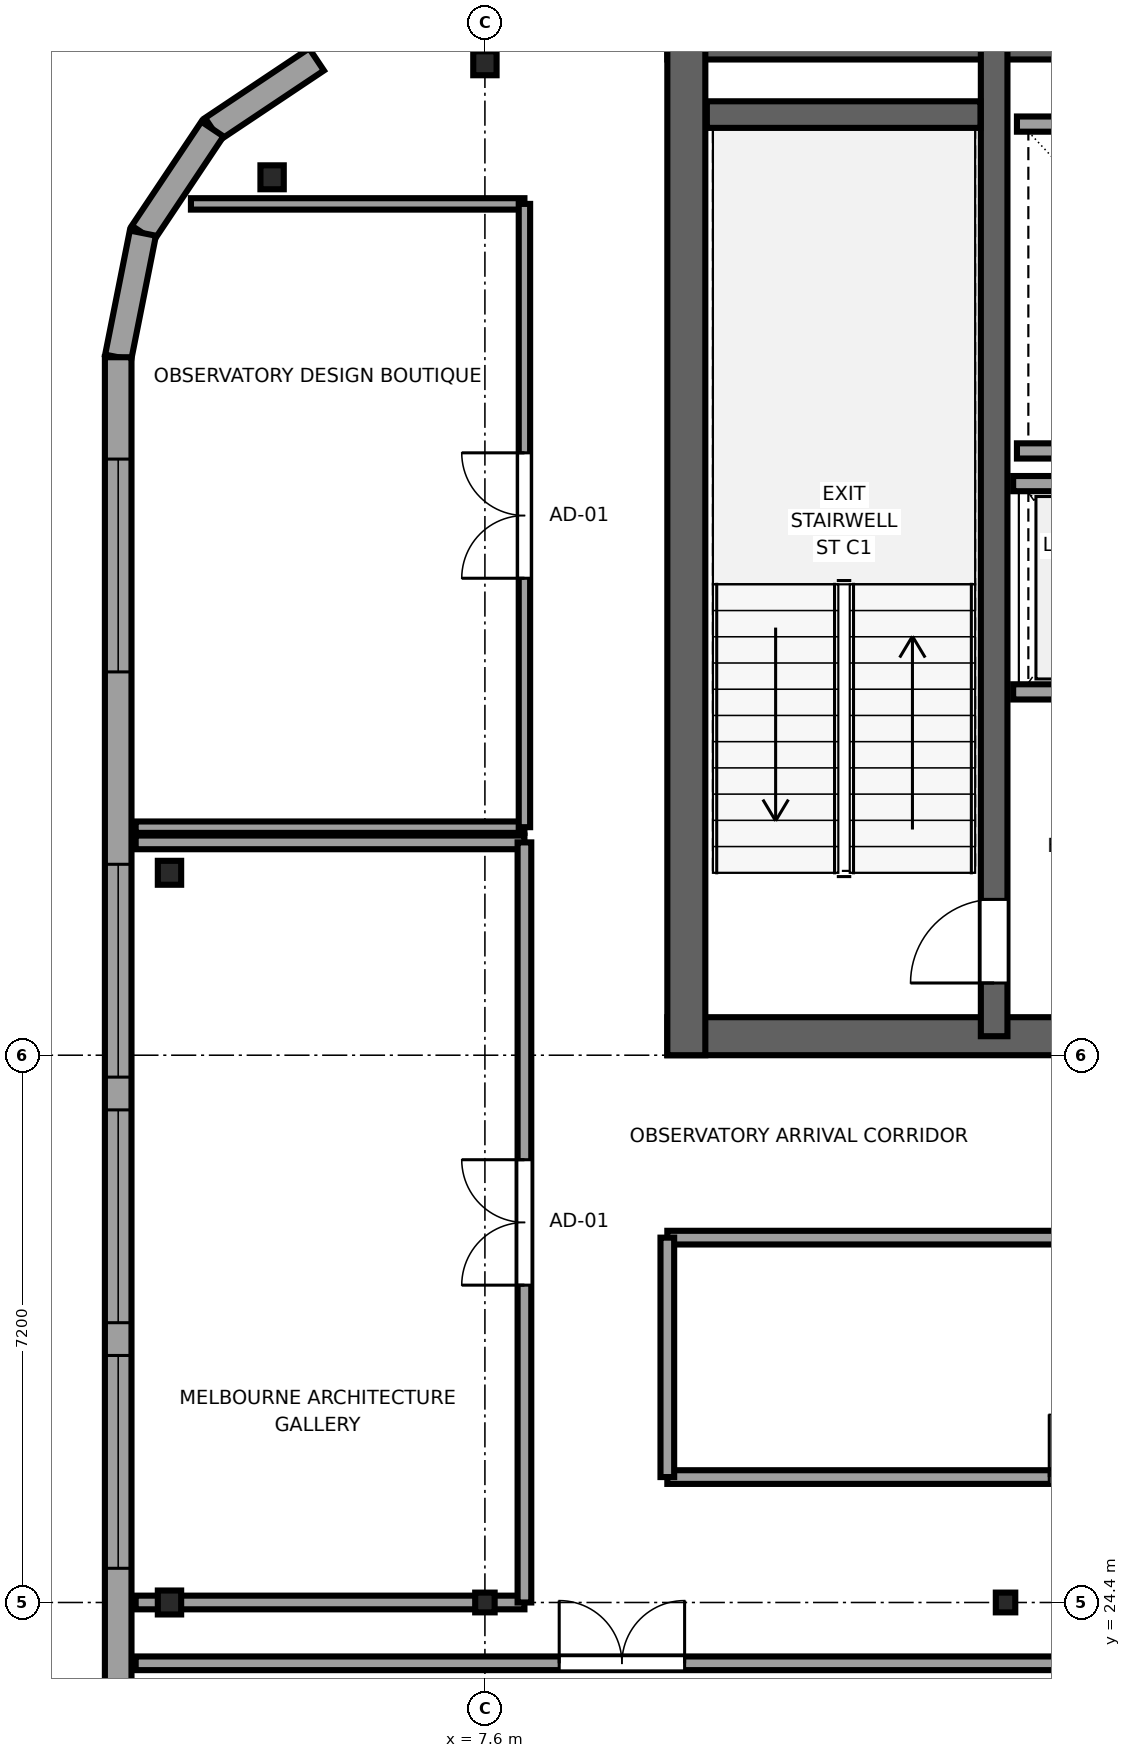
"""IFC4 building model, lengths in metres.
Left out: names, types, materials, properties, quantities, classifications, styles, units other than length and angle.
Written with IfcOpenShell. Run it as: python <this file> out.ifc"""

import sys

from ifc_helpers import new_model, si_unit, direction, frame, frame_2d, origin, origin_2d, place, context, subcontext, project, spatial, rectangle, i_section, extrude, source, transform, mapped, element, fill, save


model = new_model("IFC4")
c1 = context("Model", 3, precision=1e-05, world=origin(), true_north=direction((0.0, 1.0)))
c2 = subcontext(c1, "Body", "Model", "MODEL_VIEW")
j1 = project(units=[si_unit("LENGTHUNIT", "METRE"), si_unit("PLANEANGLEUNIT", "RADIAN")], contexts=[c1])
p1 = place(None, origin())
s1 = spatial("IfcSite", under=j1, at=p1, CompositionType="ELEMENT")
p2 = place(p1, origin())
s2 = spatial("IfcBuilding", under=s1, at=p2, CompositionType="ELEMENT")
p3 = place(p2, frame((0.0, 0.0, 282.15)))
s3 = spatial("IfcBuildingStorey", under=s2, at=p3, CompositionType="ELEMENT", Elevation=282.15)
p4 = place(p3, frame((10.0, 31.85, 0.0), z_axis=(0.0, 0.0, 1.0), x_axis=(1.0, 0.0, 0.0)))
e1 = element("IfcWall", 1, at=p4, inside=s3, PredefinedType="SHEAR", context=c2, shape_type="SweptSolid", body=[
    extrude(rectangle(XDim=26.0, YDim=0.5, at=frame_2d((13.0, 0.0))), origin(), (0.0, 0.0, 1.0), 4.4),
])
p5 = place(p4, frame((7.45, 0.0, 0.0), z_axis=(0.0, 0.0, 1.0), x_axis=(-1.0, 0.0, 0.0)))
e2 = element("IfcOpeningElement", 2, at=p5, cuts=e1, PredefinedType="OPENING", context=c2, shape_type="SweptSolid", body=[
    extrude(rectangle(XDim=1.5, YDim=2.04, at=frame_2d((0.75, 1.02))), frame((0.0, 0.26, 0.0), z_axis=(0.0, -1.0, 0.0), x_axis=(1.0, 0.0, 0.0)), (0.0, 0.0, 1.0), 0.52),
])
p6 = place(p4, frame((13.75, 0.0, 0.0), z_axis=(0.0, 0.0, 1.0), x_axis=(-1.0, 0.0, 0.0)))
e3 = element("IfcOpeningElement", 3, at=p6, cuts=e1, PredefinedType="OPENING", context=c2, shape_type="SweptSolid", body=[
    extrude(rectangle(XDim=1.5, YDim=2.04, at=frame_2d((0.75, 1.02))), frame((0.0, 0.26, 0.0), z_axis=(0.0, -1.0, 0.0), x_axis=(1.0, 0.0, 0.0)), (0.0, 0.0, 1.0), 0.52),
])
p7 = place(p4, frame((20.05, 0.0, 0.0), z_axis=(0.0, 0.0, 1.0), x_axis=(-1.0, 0.0, 0.0)))
e4 = element("IfcOpeningElement", 4, at=p7, cuts=e1, PredefinedType="OPENING", context=c2, shape_type="SweptSolid", body=[
    extrude(rectangle(XDim=1.5, YDim=2.04, at=frame_2d((0.75, 1.02))), frame((0.0, 0.26, 0.0), z_axis=(0.0, -1.0, 0.0), x_axis=(1.0, 0.0, 0.0)), (0.0, 0.0, 1.0), 0.52),
])
p8 = place(p3, frame((10.0, 44.95, 0.0), z_axis=(0.0, 0.0, 1.0), x_axis=(1.0, 0.0, 0.0)))
e5 = element("IfcWall", 5, at=p8, inside=s3, PredefinedType="SHEAR", context=c2, shape_type="SweptSolid", body=[
    extrude(rectangle(XDim=26.0, YDim=0.5, at=frame_2d((13.0, 0.0))), origin(), (0.0, 0.0, 1.0), 4.4),
])
p9 = place(p3, frame((10.25, 31.6, 0.0), z_axis=(0.0, 0.0, 1.0), x_axis=(0.0, 1.0, 0.0)))
e6 = element("IfcWall", 6, at=p9, inside=s3, PredefinedType="SHEAR", context=c2, shape_type="SweptSolid", body=[
    extrude(rectangle(XDim=13.6, YDim=0.5, at=frame_2d((6.8, 0.0))), origin(), (0.0, 0.0, 1.0), 4.4),
])
p10 = place(p3, frame((14.3, 31.85, 0.0), z_axis=(0.0, 0.0, 1.0), x_axis=(0.0, 1.0, 0.0)))
e7 = element("IfcWall", 7, at=p10, inside=s3, PredefinedType="SHEAR", context=c2, shape_type="SweptSolid", body=[
    extrude(rectangle(XDim=13.1, YDim=0.35, at=frame_2d((6.55, 0.0))), origin(), (0.0, 0.0, 1.0), 4.4),
])
p11 = place(p10, frame((0.7, 0.0, 0.0)))
e8 = element("IfcOpeningElement", 8, at=p11, cuts=e7, PredefinedType="OPENING", context=c2, shape_type="SweptSolid", body=[
    extrude(rectangle(XDim=1.1, YDim=2.12, at=frame_2d((0.55, 1.06))), frame((0.0, 0.185, 0.0), z_axis=(0.0, -1.0, 0.0), x_axis=(1.0, 0.0, 0.0)), (0.0, 0.0, 1.0), 0.37),
])
p12 = place(p3, frame((10.52, 43.975, 0.0), z_axis=(0.0, 0.0, 1.0), x_axis=(1.0, 0.0, 0.0)))
e9 = element("IfcWall", 9, at=p12, inside=s3, PredefinedType="SHEAR", context=c2, shape_type="SweptSolid", body=[
    extrude(rectangle(XDim=3.6, YDim=0.35, at=frame_2d((1.8, 0.0))), origin(), (0.0, 0.0, 1.0), 4.4),
])
m1 = source(origin(), c2, "Body", "SweptSolid", [
    extrude(i_section(OverallWidth=0.307, OverallDepth=0.315, WebThickness=0.012, FlangeThickness=0.019, FilletRadius=0.017, at=origin_2d()), origin(), (0.0, 0.0, 1.0), 4.4),
])
p13 = place(p3, frame((3.45, 24.4, 0.0), z_axis=(0.0, 0.0, 1.0), x_axis=(1.0, 0.0, 0.0)))
e10 = element("IfcColumn", 10, at=p13, inside=s3, PredefinedType="COLUMN", context=c2, shape_type="MappedRepresentation", body=[
    mapped(m1, transform((0.0, 0.0, 0.0), x_axis=(1.0, 0.0, 0.0), y_axis=(0.0, 1.0, 0.0), z_axis=(0.0, 0.0, 1.0), scale=1.0)),
])
m2 = source(origin(), c2, "Body", "SweptSolid", [
    extrude(i_section(OverallWidth=0.256, OverallDepth=0.26, WebThickness=0.01, FlangeThickness=0.017, FilletRadius=0.014, at=origin_2d()), origin(), (0.0, 0.0, 1.0), 4.4),
])
for number, where, z_axis, x_axis in (
    (11, (7.6, 24.4, 0.0), (0.0, 0.0, 1.0), (1.0, 0.0, 0.0)),
    (12, (14.45, 24.4, 0.0), (0.0, 0.0, 1.0), (1.0, 0.0, 0.0)),
):
    element("IfcColumn", number, at=place(p3, frame(where, z_axis=z_axis, x_axis=x_axis)), inside=s3, PredefinedType="COLUMN", context=c2, shape_type="MappedRepresentation", body=[
        mapped(m2, transform((0.0, 0.0, 0.0), x_axis=(1.0, 0.0, 0.0), y_axis=(0.0, 1.0, 0.0), z_axis=(0.0, 0.0, 1.0), scale=1.0)),
    ])
for number, where, z_axis, x_axis in (
    (13, (4.8, 43.15, 0.0), (0.0, 0.0, 1.0), (1.0, 0.0, 0.0)),
    (14, (7.6, 44.65, 0.0), (0.0, 0.0, 1.0), (1.0, 0.0, 0.0)),
    (15, (3.45, 34.0, 0.0), (0.0, 0.0, 1.0), (1.0, 0.0, 0.0)),
):
    element("IfcColumn", number, at=place(p3, frame(where, z_axis=z_axis, x_axis=x_axis)), inside=s3, PredefinedType="COLUMN", context=c2, shape_type="MappedRepresentation", body=[
        mapped(m1, transform((0.0, 0.0, 0.0), x_axis=(1.0, 0.0, 0.0), y_axis=(0.0, 1.0, 0.0), z_axis=(0.0, 0.0, 1.0), scale=1.0)),
    ])
for number, where, z_axis, x_axis in (
    (16, (5.385, 44.7, 0.0), (0.0, 0.0, 1.0), (-0.832, -0.556, 0.0)),
    (17, (4.015, 43.785, 0.0), (0.0, 0.0, 1.0), (-0.556, -0.831, 0.0)),
):
    element("IfcWall", number, at=place(p3, frame(where, z_axis=z_axis, x_axis=x_axis)), inside=s3, PredefinedType="SOLIDWALL", context=c2, shape_type="SweptSolid", body=[
        extrude(rectangle(XDim=1.647, YDim=0.35, at=frame_2d((0.824, 0.0))), origin(), (0.0, 0.0, 1.0), 3.71),
    ])
p14 = place(p3, frame((3.1, 42.416, 0.0), z_axis=(0.0, 0.0, 1.0), x_axis=(-0.195044345786, -0.980794424524, 0.0)))
e18 = element("IfcWall", 18, at=p14, inside=s3, PredefinedType="SOLIDWALL", context=c2, shape_type="SweptSolid", body=[
    extrude(rectangle(XDim=1.665, YDim=0.35, at=frame_2d((0.833, 0.0))), origin(), (0.0, 0.0, 1.0), 4.18),
])
p15 = place(p3, frame((2.775, 40.783, 0.0), z_axis=(0.0, 0.0, 1.0), x_axis=(0.0, -1.0, 0.0)))
e19 = element("IfcWall", 19, at=p15, inside=s3, PredefinedType="SOLIDWALL", context=c2, shape_type="SweptSolid", body=[
    extrude(rectangle(XDim=31.166, YDim=0.35, at=frame_2d((15.583, 0.0))), origin(), (0.0, 0.0, 1.0), 4.18),
])
p16 = place(p15, frame((1.34, 0.0, 0.62)))
e20 = element("IfcOpeningElement", 20, at=p16, cuts=e19, PredefinedType="OPENING", context=c2, shape_type="SweptSolid", body=[
    extrude(rectangle(XDim=2.8, YDim=2.25, at=frame_2d((1.4, 1.125))), frame((0.0, 0.185, 0.0), z_axis=(0.0, -1.0, 0.0), x_axis=(1.0, 0.0, 0.0)), (0.0, 0.0, 1.0), 0.37),
])
p17 = place(p15, frame((6.671, 0.0, 0.62)))
e21 = element("IfcOpeningElement", 21, at=p17, cuts=e19, PredefinedType="OPENING", context=c2, shape_type="SweptSolid", body=[
    extrude(rectangle(XDim=2.8, YDim=2.25, at=frame_2d((1.4, 1.125))), frame((0.0, 0.185, 0.0), z_axis=(0.0, -1.0, 0.0), x_axis=(1.0, 0.0, 0.0)), (0.0, 0.0, 1.0), 0.37),
])
p18 = place(p15, frame((9.902, 0.0, 0.62)))
e22 = element("IfcOpeningElement", 22, at=p18, cuts=e19, PredefinedType="OPENING", context=c2, shape_type="SweptSolid", body=[
    extrude(rectangle(XDim=2.8, YDim=2.25, at=frame_2d((1.4, 1.125))), frame((0.0, 0.185, 0.0), z_axis=(0.0, -1.0, 0.0), x_axis=(1.0, 0.0, 0.0)), (0.0, 0.0, 1.0), 0.37),
])
p19 = place(p15, frame((13.133, 0.0, 0.62)))
e23 = element("IfcOpeningElement", 23, at=p19, cuts=e19, PredefinedType="OPENING", context=c2, shape_type="SweptSolid", body=[
    extrude(rectangle(XDim=2.8, YDim=2.25, at=frame_2d((1.4, 1.125))), frame((0.0, 0.185, 0.0), z_axis=(0.0, -1.0, 0.0), x_axis=(1.0, 0.0, 0.0)), (0.0, 0.0, 1.0), 0.37),
])
p20 = place(p15, frame((18.464, 0.0, 0.62)))
e24 = element("IfcOpeningElement", 24, at=p20, cuts=e19, PredefinedType="OPENING", context=c2, shape_type="SweptSolid", body=[
    extrude(rectangle(XDim=2.8, YDim=2.25, at=frame_2d((1.4, 1.125))), frame((0.0, 0.185, 0.0), z_axis=(0.0, -1.0, 0.0), x_axis=(1.0, 0.0, 0.0)), (0.0, 0.0, 1.0), 0.37),
])
p21 = place(p15, frame((22.744, 0.0, 0.62)))
e25 = element("IfcOpeningElement", 25, at=p21, cuts=e19, PredefinedType="OPENING", context=c2, shape_type="SweptSolid", body=[
    extrude(rectangle(XDim=2.8, YDim=2.25, at=frame_2d((1.4, 1.125))), frame((0.0, 0.185, 0.0), z_axis=(0.0, -1.0, 0.0), x_axis=(1.0, 0.0, 0.0)), (0.0, 0.0, 1.0), 0.37),
])
p22 = place(p15, frame((27.025, 0.0, 0.62)))
e26 = element("IfcOpeningElement", 26, at=p22, cuts=e19, PredefinedType="OPENING", context=c2, shape_type="SweptSolid", body=[
    extrude(rectangle(XDim=2.8, YDim=2.25, at=frame_2d((1.4, 1.125))), frame((0.0, 0.185, 0.0), z_axis=(0.0, -1.0, 0.0), x_axis=(1.0, 0.0, 0.0)), (0.0, 0.0, 1.0), 0.37),
])
for number, where, z_axis, x_axis in (
    (27, (14.6, 39.55, 0.0), (0.0, 0.0, 1.0), (1.0, 0.0, 0.0)),
    (28, (14.6, 43.85, 0.0), (0.0, 0.0, 1.0), (1.0, 0.0, 0.0)),
):
    element("IfcWall", number, at=place(p3, frame(where, z_axis=z_axis, x_axis=x_axis)), inside=s3, PredefinedType="SOLIDWALL", context=c2, shape_type="SweptSolid", body=[
        extrude(rectangle(XDim=4.1, YDim=0.2, at=frame_2d((2.05, 0.0))), origin(), (0.0, 0.0, 1.0), 4.18),
    ])
p23 = place(p3, frame((14.55, 36.38, 0.0), z_axis=(0.0, 0.0, 1.0), x_axis=(1.0, 0.0, 0.0)))
e29 = element("IfcWall", 29, at=p23, inside=s3, PredefinedType="SOLIDWALL", context=c2, shape_type="SweptSolid", body=[
    extrude(rectangle(XDim=4.075, YDim=0.2, at=frame_2d((2.038, 0.0))), origin(), (0.0, 0.0, 1.0), 4.18),
])
p24 = place(p23, frame((0.55, 0.0, 0.0)))
e30 = element("IfcOpeningElement", 30, at=p24, cuts=e29, PredefinedType="OPENING", context=c2, shape_type="SweptSolid", body=[
    extrude(rectangle(XDim=1.1, YDim=2.12, at=frame_2d((0.55, 1.06))), frame((0.0, 0.11, 0.0), z_axis=(0.0, -1.0, 0.0), x_axis=(1.0, 0.0, 0.0)), (0.0, 0.0, 1.0), 0.22),
])
p25 = place(p23, frame((2.45, 0.0, 0.0)))
e31 = element("IfcOpeningElement", 31, at=p25, cuts=e29, PredefinedType="OPENING", context=c2, shape_type="SweptSolid", body=[
    extrude(rectangle(XDim=1.1, YDim=2.12, at=frame_2d((0.55, 1.06))), frame((0.0, 0.11, 0.0), z_axis=(0.0, -1.0, 0.0), x_axis=(1.0, 0.0, 0.0)), (0.0, 0.0, 1.0), 0.22),
])
p26 = place(p3, frame((14.55, 39.12, 0.0), z_axis=(0.0, 0.0, 1.0), x_axis=(1.0, 0.0, 0.0)))
e32 = element("IfcWall", 32, at=p26, inside=s3, PredefinedType="SOLIDWALL", context=c2, shape_type="SweptSolid", body=[
    extrude(rectangle(XDim=4.075, YDim=0.2, at=frame_2d((2.038, 0.0))), origin(), (0.0, 0.0, 1.0), 4.18),
])
p27 = place(p3, frame((3.005, 23.6, 0.0), z_axis=(0.0, 0.0, 1.0), x_axis=(1.0, 0.0, 0.0)))
e33 = element("IfcWall", 33, at=p27, inside=s3, PredefinedType="PARTITIONING", context=c2, shape_type="SweptSolid", body=[
    extrude(rectangle(XDim=12.195, YDim=0.18, at=frame_2d((6.098, 0.0))), origin(), (0.0, 0.0, 1.0), 4.18),
])
p28 = place(p27, frame((5.573, 0.0, 0.0)))
e34 = element("IfcOpeningElement", 34, at=p28, cuts=e33, PredefinedType="OPENING", context=c2, shape_type="SweptSolid", body=[
    extrude(rectangle(XDim=1.65, YDim=2.15, at=frame_2d((0.825, 1.075))), frame((0.0, 0.1, 0.0), z_axis=(0.0, -1.0, 0.0), x_axis=(1.0, 0.0, 0.0)), (0.0, 0.0, 1.0), 0.2),
])
p29 = place(p3, frame((10.0, 26.05, 0.0), z_axis=(0.0, 0.0, 1.0), x_axis=(1.0, 0.0, 0.0)))
e35 = element("IfcWall", 35, at=p29, inside=s3, PredefinedType="PARTITIONING", context=c2, shape_type="SweptSolid", body=[
    extrude(rectangle(XDim=11.7, YDim=0.18, at=frame_2d((5.85, 0.0))), origin(), (0.0, 0.0, 1.0), 4.18),
])
p30 = place(p29, frame((5.025, 0.0, 0.0)))
e36 = element("IfcOpeningElement", 36, at=p30, cuts=e35, PredefinedType="OPENING", context=c2, shape_type="SweptSolid", body=[
    extrude(rectangle(XDim=1.65, YDim=2.15, at=frame_2d((0.825, 1.075))), frame((0.0, 0.1, 0.0), z_axis=(0.0, -1.0, 0.0), x_axis=(1.0, 0.0, 0.0)), (0.0, 0.0, 1.0), 0.2),
])
p31 = place(p3, frame((10.0, 29.2, 0.0), z_axis=(0.0, 0.0, 1.0), x_axis=(1.0, 0.0, 0.0)))
e37 = element("IfcWall", 37, at=p31, inside=s3, PredefinedType="PARTITIONING", context=c2, shape_type="SweptSolid", body=[
    extrude(rectangle(XDim=11.7, YDim=0.18, at=frame_2d((5.85, 0.0))), origin(), (0.0, 0.0, 1.0), 4.18),
])
p32 = place(p3, frame((10.0, 26.05, 0.0), z_axis=(0.0, 0.0, 1.0), x_axis=(0.0, 1.0, 0.0)))
e38 = element("IfcWall", 38, at=p32, inside=s3, PredefinedType="PARTITIONING", context=c2, shape_type="SweptSolid", body=[
    extrude(rectangle(XDim=3.15, YDim=0.18, at=frame_2d((1.575, 0.0))), origin(), (0.0, 0.0, 1.0), 4.18),
])
p33 = place(p3, frame((3.005, 24.4, 0.0), z_axis=(0.0, 0.0, 1.0), x_axis=(1.0, 0.0, 0.0)))
e39 = element("IfcWall", 39, at=p33, inside=s3, PredefinedType="PARTITIONING", context=c2, shape_type="SweptSolid", body=[
    extrude(rectangle(XDim=5.115, YDim=0.18, at=frame_2d((2.558, 0.0))), origin(), (0.0, 0.0, 1.0), 3.637),
])
p34 = place(p3, frame((3.005, 34.4, 0.0), z_axis=(0.0, 0.0, 1.0), x_axis=(1.0, 0.0, 0.0)))
e40 = element("IfcWall", 40, at=p34, inside=s3, PredefinedType="PARTITIONING", context=c2, shape_type="SweptSolid", body=[
    extrude(rectangle(XDim=5.115, YDim=0.18, at=frame_2d((2.558, 0.0))), origin(), (0.0, 0.0, 1.0), 4.18),
])
p35 = place(p3, frame((8.12, 24.4, 0.0), z_axis=(0.0, 0.0, 1.0), x_axis=(0.0, 1.0, 0.0)))
e41 = element("IfcWall", 41, at=p35, inside=s3, PredefinedType="PARTITIONING", context=c2, shape_type="SweptSolid", body=[
    extrude(rectangle(XDim=10.0, YDim=0.18, at=frame_2d((5.0, 0.0))), origin(), (0.0, 0.0, 1.0), 4.18),
])
p36 = place(p35, frame((4.175, 0.0, 0.0)))
e42 = element("IfcOpeningElement", 42, at=p36, cuts=e41, PredefinedType="OPENING", context=c2, shape_type="SweptSolid", body=[
    extrude(rectangle(XDim=1.65, YDim=2.15, at=frame_2d((0.825, 1.075))), frame((0.0, 0.1, 0.0), z_axis=(0.0, -1.0, 0.0), x_axis=(1.0, 0.0, 0.0)), (0.0, 0.0, 1.0), 0.2),
])
p37 = place(p3, frame((3.005, 34.6, 0.0), z_axis=(0.0, 0.0, 1.0), x_axis=(1.0, 0.0, 0.0)))
e43 = element("IfcWall", 43, at=p37, inside=s3, PredefinedType="PARTITIONING", context=c2, shape_type="SweptSolid", body=[
    extrude(rectangle(XDim=5.115, YDim=0.15, at=frame_2d((2.558, 0.0))), origin(), (0.0, 0.0, 1.0), 4.18),
])
p38 = place(p3, frame((3.732, 42.8, 0.0), z_axis=(0.0, 0.0, 1.0), x_axis=(1.0, 0.0, 0.0)))
e44 = element("IfcWall", 44, at=p38, inside=s3, PredefinedType="PARTITIONING", context=c2, shape_type="SweptSolid", body=[
    extrude(rectangle(XDim=4.388, YDim=0.15, at=frame_2d((2.194, 0.0))), origin(), (0.0, 0.0, 1.0), 4.18),
])
p39 = place(p3, frame((8.12, 34.6, 0.0), z_axis=(0.0, 0.0, 1.0), x_axis=(0.0, 1.0, 0.0)))
e45 = element("IfcWall", 45, at=p39, inside=s3, PredefinedType="PARTITIONING", context=c2, shape_type="SweptSolid", body=[
    extrude(rectangle(XDim=8.2, YDim=0.15, at=frame_2d((4.1, 0.0))), origin(), (0.0, 0.0, 1.0), 4.18),
])
p40 = place(p39, frame((3.275, 0.0, 0.0)))
e46 = element("IfcOpeningElement", 46, at=p40, cuts=e45, PredefinedType="OPENING", context=c2, shape_type="SweptSolid", body=[
    extrude(rectangle(XDim=1.65, YDim=2.15, at=frame_2d((0.825, 1.075))), frame((0.0, 0.085, 0.0), z_axis=(0.0, -1.0, 0.0), x_axis=(1.0, 0.0, 0.0)), (0.0, 0.0, 1.0), 0.17),
])
m3 = source(origin(), c2, "Body", "SweptSolid", [
    extrude(rectangle(XDim=2.8, YDim=2.25, at=frame_2d((1.4, 1.125))), frame((0.0, 0.09, 0.0), z_axis=(0.0, -1.0, 0.0), x_axis=(1.0, 0.0, 0.0)), (0.0, 0.0, 1.0), 0.06),
])
p41 = place(p16, origin())
e47 = element("IfcWindow", 47, at=p41, inside=s3, PartitioningType="TRIPLE_PANEL_HORIZONTAL", PredefinedType="WINDOW", context=c2, shape_type="MappedRepresentation", body=[
    mapped(m3, transform((0.0, 0.0, 0.0), x_axis=(1.0, 0.0, 0.0), y_axis=(0.0, 1.0, 0.0), z_axis=(0.0, 0.0, 1.0), scale=1.0)),
])
fill(e20, e47)
p42 = place(p17, origin())
e48 = element("IfcWindow", 48, at=p42, inside=s3, PartitioningType="TRIPLE_PANEL_HORIZONTAL", PredefinedType="WINDOW", context=c2, shape_type="MappedRepresentation", body=[
    mapped(m3, transform((0.0, 0.0, 0.0), x_axis=(1.0, 0.0, 0.0), y_axis=(0.0, 1.0, 0.0), z_axis=(0.0, 0.0, 1.0), scale=1.0)),
])
fill(e21, e48)
p43 = place(p18, origin())
e49 = element("IfcWindow", 49, at=p43, inside=s3, PartitioningType="TRIPLE_PANEL_HORIZONTAL", PredefinedType="WINDOW", context=c2, shape_type="MappedRepresentation", body=[
    mapped(m3, transform((0.0, 0.0, 0.0), x_axis=(1.0, 0.0, 0.0), y_axis=(0.0, 1.0, 0.0), z_axis=(0.0, 0.0, 1.0), scale=1.0)),
])
fill(e22, e49)
p44 = place(p19, origin())
e50 = element("IfcWindow", 50, at=p44, inside=s3, PartitioningType="TRIPLE_PANEL_HORIZONTAL", PredefinedType="WINDOW", context=c2, shape_type="MappedRepresentation", body=[
    mapped(m3, transform((0.0, 0.0, 0.0), x_axis=(1.0, 0.0, 0.0), y_axis=(0.0, 1.0, 0.0), z_axis=(0.0, 0.0, 1.0), scale=1.0)),
])
fill(e23, e50)
m4 = source(origin(), c2, "Body", "SweptSolid", [
    extrude(rectangle(XDim=1.1, YDim=2.12, at=frame_2d((0.55, 1.06))), frame((0.0, 0.025, 0.0), z_axis=(0.0, -1.0, 0.0), x_axis=(1.0, 0.0, 0.0)), (0.0, 0.0, 1.0), 0.05),
])
p45 = place(p11, origin())
e51 = element("IfcDoor", 51, at=p45, inside=s3, OperationType="SINGLE_SWING_LEFT", PredefinedType="DOOR", context=c2, shape_type="MappedRepresentation", body=[
    mapped(m4, transform((0.0, 0.0, 0.0), x_axis=(1.0, 0.0, 0.0), y_axis=(0.0, 1.0, 0.0), z_axis=(0.0, 0.0, 1.0), scale=1.0)),
])
fill(e8, e51)
m5 = source(origin(), c2, "Body", "SweptSolid", [
    extrude(rectangle(XDim=1.65, YDim=2.15, at=frame_2d((0.825, 1.075))), frame((0.0, 0.025, 0.0), z_axis=(0.0, -1.0, 0.0), x_axis=(1.0, 0.0, 0.0)), (0.0, 0.0, 1.0), 0.05),
])
p46 = place(p28, origin())
e52 = element("IfcDoor", 52, at=p46, inside=s3, OperationType="DOUBLE_DOOR_SINGLE_SWING", PredefinedType="DOOR", context=c2, shape_type="MappedRepresentation", body=[
    mapped(m5, transform((0.0, 0.0, 0.0), x_axis=(1.0, 0.0, 0.0), y_axis=(0.0, 1.0, 0.0), z_axis=(0.0, 0.0, 1.0), scale=1.0)),
])
fill(e34, e52)
p47 = place(p30, origin())
e53 = element("IfcDoor", 53, at=p47, inside=s3, OperationType="DOUBLE_DOOR_SINGLE_SWING", PredefinedType="DOOR", context=c2, shape_type="MappedRepresentation", body=[
    mapped(m5, transform((0.0, 0.0, 0.0), x_axis=(1.0, 0.0, 0.0), y_axis=(0.0, 1.0, 0.0), z_axis=(0.0, 0.0, 1.0), scale=1.0)),
])
fill(e36, e53)
p48 = place(p36, origin())
e54 = element("IfcDoor", 54, at=p48, inside=s3, OperationType="DOUBLE_DOOR_SINGLE_SWING", PredefinedType="DOOR", context=c2, shape_type="MappedRepresentation", body=[
    mapped(m5, transform((0.0, 0.0, 0.0), x_axis=(1.0, 0.0, 0.0), y_axis=(0.0, 1.0, 0.0), z_axis=(0.0, 0.0, 1.0), scale=1.0)),
])
fill(e42, e54)
p49 = place(p40, origin())
e55 = element("IfcDoor", 55, at=p49, inside=s3, OperationType="DOUBLE_DOOR_SINGLE_SWING", PredefinedType="DOOR", context=c2, shape_type="MappedRepresentation", body=[
    mapped(m5, transform((0.0, 0.0, 0.0), x_axis=(1.0, 0.0, 0.0), y_axis=(0.0, 1.0, 0.0), z_axis=(0.0, 0.0, 1.0), scale=1.0)),
])
fill(e46, e55)
save(model, sys.argv[1])
